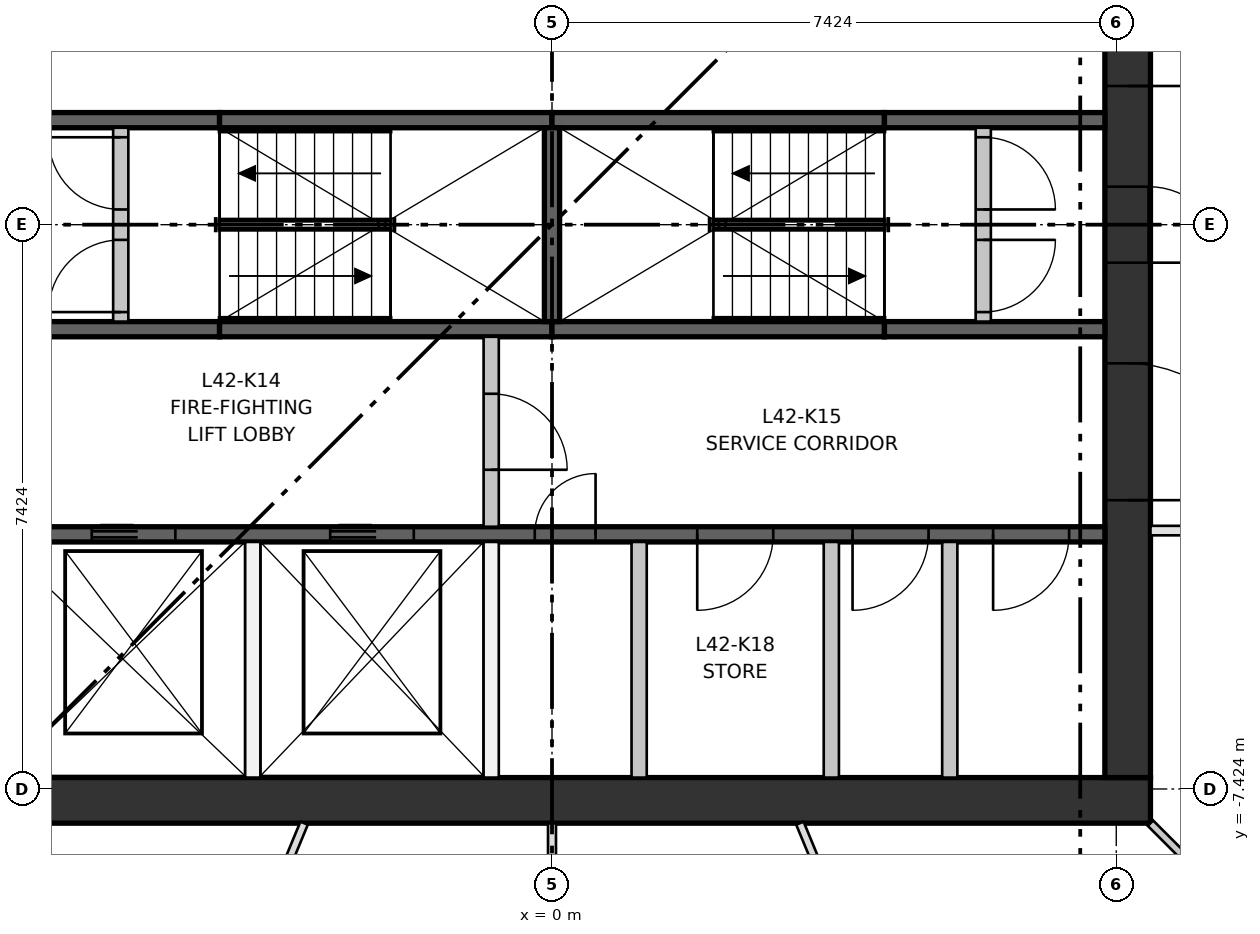
"""IFC4 building model, lengths in metres.
Left out: names, types, materials, properties, quantities, classifications, styles, units other than length and angle.
Written with IfcOpenShell. Run it as: python <this file> out.ifc"""

import sys

from ifc_helpers import new_model, si_unit, direction, frame, frame_2d, origin, place, context, subcontext, project, spatial, rectangle, extrude, element, fill, save


model = new_model("IFC4")
c1 = context("Model", 3, precision=1e-05, world=origin(), true_north=direction((0.0, 1.0)))
c2 = subcontext(c1, "Body", "Model", "MODEL_VIEW")
j1 = project(units=[si_unit("LENGTHUNIT", "METRE"), si_unit("PLANEANGLEUNIT", "RADIAN")], contexts=[c1])
p1 = place(None, origin())
s1 = spatial("IfcSite", under=j1, at=p1, CompositionType="ELEMENT")
p2 = place(p1, origin())
s2 = spatial("IfcBuilding", under=s1, at=p2, CompositionType="ELEMENT")
p3 = place(p2, frame((0.0, 0.0, 157.8)))
s3 = spatial("IfcBuildingStorey", under=s2, at=p3, CompositionType="ELEMENT", Elevation=157.8)
p4 = place(p3, frame((-7.874, -7.574, 0.0), z_axis=(0.0, 0.0, 1.0), x_axis=(1.0, 0.0, 0.0)))
e1 = element("IfcWall", 1, at=p4, inside=s3, PredefinedType="SHEAR", context=c2, shape_type="SweptSolid", body=[
    extrude(rectangle(XDim=15.748, YDim=0.6, at=frame_2d((7.874, 0.0))), origin(), (0.0, 0.0, 1.0), 3.35),
])
p5 = place(p3, frame((7.574, -7.274, 0.0), z_axis=(0.0, 0.0, 1.0), x_axis=(0.0, 1.0, 0.0)))
e2 = element("IfcWall", 2, at=p5, inside=s3, PredefinedType="SHEAR", context=c2, shape_type="SweptSolid", body=[
    extrude(rectangle(XDim=14.548, YDim=0.6, at=frame_2d((7.274, 0.0))), origin(), (0.0, 0.0, 1.0), 3.35),
])
p6 = place(p5, frame((6.774, 0.0, 0.0)))
e3 = element("IfcOpeningElement", 3, at=p6, cuts=e2, PredefinedType="OPENING", context=c2, shape_type="SweptSolid", body=[
    extrude(rectangle(XDim=1.0, YDim=2.1, at=frame_2d((0.5, 1.05))), frame((0.0, 0.31, 0.0), z_axis=(0.0, -1.0, 0.0), x_axis=(1.0, 0.0, 0.0)), (0.0, 0.0, 1.0), 0.62),
])
p7 = place(p5, frame((3.649, 0.0, 0.0)))
e4 = element("IfcOpeningElement", 4, at=p7, cuts=e2, PredefinedType="OPENING", context=c2, shape_type="SweptSolid", body=[
    extrude(rectangle(XDim=1.8, YDim=2.1, at=frame_2d((0.9, 1.05))), frame((0.0, 0.31, 0.0), z_axis=(0.0, -1.0, 0.0), x_axis=(1.0, 0.0, 0.0)), (0.0, 0.0, 1.0), 0.62),
])
p8 = place(p5, frame((9.098, 0.0, 0.0)))
e5 = element("IfcOpeningElement", 5, at=p8, cuts=e2, PredefinedType="OPENING", context=c2, shape_type="SweptSolid", body=[
    extrude(rectangle(XDim=1.8, YDim=2.1, at=frame_2d((0.9, 1.05))), frame((0.0, 0.31, 0.0), z_axis=(0.0, -1.0, 0.0), x_axis=(1.0, 0.0, 0.0)), (0.0, 0.0, 1.0), 0.62),
])
p9 = place(p3, frame((-7.274, -4.074, 0.0), z_axis=(0.0, 0.0, 1.0), x_axis=(1.0, 0.0, 0.0)))
e6 = element("IfcWall", 6, at=p9, inside=s3, PredefinedType="SHEAR", context=c2, shape_type="SweptSolid", body=[
    extrude(rectangle(XDim=14.548, YDim=0.2, at=frame_2d((7.274, 0.0))), origin(), (0.0, 0.0, 1.0), 3.0),
])
p10 = place(p9, frame((1.219, 0.0, 0.0)))
e7 = element("IfcOpeningElement", 7, at=p10, cuts=e6, PredefinedType="OPENING", context=c2, shape_type="SweptSolid", body=[
    extrude(rectangle(XDim=1.1, YDim=2.1, at=frame_2d((0.55, 1.05))), frame((0.0, 0.11, 0.0), z_axis=(0.0, -1.0, 0.0), x_axis=(1.0, 0.0, 0.0)), (0.0, 0.0, 1.0), 0.22),
])
p11 = place(p9, frame((4.355, 0.0, 0.0)))
e8 = element("IfcOpeningElement", 8, at=p11, cuts=e6, PredefinedType="OPENING", context=c2, shape_type="SweptSolid", body=[
    extrude(rectangle(XDim=1.1, YDim=2.1, at=frame_2d((0.55, 1.05))), frame((0.0, 0.11, 0.0), z_axis=(0.0, -1.0, 0.0), x_axis=(1.0, 0.0, 0.0)), (0.0, 0.0, 1.0), 0.22),
])
p12 = place(p9, frame((7.047, 0.0, 0.0)))
e9 = element("IfcOpeningElement", 9, at=p12, cuts=e6, PredefinedType="OPENING", context=c2, shape_type="SweptSolid", body=[
    extrude(rectangle(XDim=0.8, YDim=2.1, at=frame_2d((0.4, 1.05))), frame((0.0, 0.11, 0.0), z_axis=(0.0, -1.0, 0.0), x_axis=(1.0, 0.0, 0.0)), (0.0, 0.0, 1.0), 0.22),
])
p13 = place(p9, frame((9.185, 0.0, 0.0)))
e10 = element("IfcOpeningElement", 10, at=p13, cuts=e6, PredefinedType="OPENING", context=c2, shape_type="SweptSolid", body=[
    extrude(rectangle(XDim=1.0, YDim=2.1, at=frame_2d((0.5, 1.05))), frame((0.0, 0.11, 0.0), z_axis=(0.0, -1.0, 0.0), x_axis=(1.0, 0.0, 0.0)), (0.0, 0.0, 1.0), 0.22),
])
p14 = place(p9, frame((11.228, 0.0, 0.0)))
e11 = element("IfcOpeningElement", 11, at=p14, cuts=e6, PredefinedType="OPENING", context=c2, shape_type="SweptSolid", body=[
    extrude(rectangle(XDim=1.0, YDim=2.1, at=frame_2d((0.5, 1.05))), frame((0.0, 0.11, 0.0), z_axis=(0.0, -1.0, 0.0), x_axis=(1.0, 0.0, 0.0)), (0.0, 0.0, 1.0), 0.22),
])
p15 = place(p9, frame((13.078, 0.0, 0.0)))
e12 = element("IfcOpeningElement", 12, at=p15, cuts=e6, PredefinedType="OPENING", context=c2, shape_type="SweptSolid", body=[
    extrude(rectangle(XDim=1.0, YDim=2.1, at=frame_2d((0.5, 1.05))), frame((0.0, 0.11, 0.0), z_axis=(0.0, -1.0, 0.0), x_axis=(1.0, 0.0, 0.0)), (0.0, 0.0, 1.0), 0.22),
])
p16 = place(p3, frame((-7.274, -1.375, 0.0), z_axis=(0.0, 0.0, 1.0), x_axis=(1.0, 0.0, 0.0)))
e13 = element("IfcWall", 13, at=p16, inside=s3, PredefinedType="SHEAR", context=c2, shape_type="SweptSolid", body=[
    extrude(rectangle(XDim=2.9, YDim=0.2, at=frame_2d((1.45, 0.0))), origin(), (0.0, 0.0, 1.0), 3.0),
])
for number, where, z_axis, x_axis in (
    (14, (-4.374, -1.375, 0.0), (0.0, 0.0, 1.0), (1.0, 0.0, 0.0)),
    (15, (0.0, -1.375, 0.0), (0.0, 0.0, 1.0), (1.0, 0.0, 0.0)),
):
    element("IfcWall", number, at=place(p3, frame(where, z_axis=z_axis, x_axis=x_axis)), inside=s3, PredefinedType="SHEAR", context=c2, shape_type="SweptSolid", body=[
        extrude(rectangle(XDim=4.374, YDim=0.2, at=frame_2d((2.187, 0.0))), origin(), (0.0, 0.0, 1.0), 3.0),
    ])
for number, where, z_axis, x_axis in (
    (16, (4.374, -1.375, 0.0), (0.0, 0.0, 1.0), (1.0, 0.0, 0.0)),
    (17, (-7.274, 1.375, 0.0), (0.0, 0.0, 1.0), (1.0, 0.0, 0.0)),
):
    element("IfcWall", number, at=place(p3, frame(where, z_axis=z_axis, x_axis=x_axis)), inside=s3, PredefinedType="SHEAR", context=c2, shape_type="SweptSolid", body=[
        extrude(rectangle(XDim=2.9, YDim=0.2, at=frame_2d((1.45, 0.0))), origin(), (0.0, 0.0, 1.0), 3.0),
    ])
for number, where, z_axis, x_axis in (
    (18, (-4.374, 1.375, 0.0), (0.0, 0.0, 1.0), (1.0, 0.0, 0.0)),
    (19, (0.0, 1.375, 0.0), (0.0, 0.0, 1.0), (1.0, 0.0, 0.0)),
):
    element("IfcWall", number, at=place(p3, frame(where, z_axis=z_axis, x_axis=x_axis)), inside=s3, PredefinedType="SHEAR", context=c2, shape_type="SweptSolid", body=[
        extrude(rectangle(XDim=4.374, YDim=0.2, at=frame_2d((2.187, 0.0))), origin(), (0.0, 0.0, 1.0), 3.0),
    ])
p17 = place(p3, frame((4.374, 1.375, 0.0), z_axis=(0.0, 0.0, 1.0), x_axis=(1.0, 0.0, 0.0)))
e20 = element("IfcWall", 20, at=p17, inside=s3, PredefinedType="SHEAR", context=c2, shape_type="SweptSolid", body=[
    extrude(rectangle(XDim=2.9, YDim=0.2, at=frame_2d((1.45, 0.0))), origin(), (0.0, 0.0, 1.0), 3.0),
])
p18 = place(p3, frame((0.0, -1.275, 0.0), z_axis=(0.0, 0.0, 1.0), x_axis=(0.0, 1.0, 0.0)))
e21 = element("IfcWall", 21, at=p18, inside=s3, PredefinedType="SHEAR", context=c2, shape_type="SweptSolid", body=[
    extrude(rectangle(XDim=2.55, YDim=0.2, at=frame_2d((1.275, 0.0))), origin(), (0.0, 0.0, 1.0), 3.0),
])
for number, where, z_axis, x_axis in (
    (22, (-3.937, -7.274, 0.0), (0.0, 0.0, 1.0), (0.0, 1.0, 0.0)),
    (23, (-0.8, -7.274, 0.0), (0.0, 0.0, 1.0), (0.0, 1.0, 0.0)),
):
    element("IfcWall", number, at=place(p3, frame(where, z_axis=z_axis, x_axis=x_axis)), inside=s3, PredefinedType="PARTITIONING", context=c2, shape_type="SweptSolid", body=[
        extrude(rectangle(XDim=3.1, YDim=0.2, at=frame_2d((1.55, 0.0))), origin(), (0.0, 0.0, 1.0), 3.0),
    ])
p19 = place(p3, frame((-0.8, -3.974, 0.0), z_axis=(0.0, 0.0, 1.0), x_axis=(0.0, 1.0, 0.0)))
e24 = element("IfcWall", 24, at=p19, inside=s3, PredefinedType="PARTITIONING", context=c2, shape_type="SweptSolid", body=[
    extrude(rectangle(XDim=2.499, YDim=0.2, at=frame_2d((1.25, 0.0))), origin(), (0.0, 0.0, 1.0), 3.0),
])
p20 = place(p19, frame((0.75, 0.0, 0.0)))
e25 = element("IfcOpeningElement", 25, at=p20, cuts=e24, PredefinedType="OPENING", context=c2, shape_type="SweptSolid", body=[
    extrude(rectangle(XDim=1.0, YDim=2.1, at=frame_2d((0.5, 1.05))), frame((0.0, 0.11, 0.0), z_axis=(0.0, -1.0, 0.0), x_axis=(1.0, 0.0, 0.0)), (0.0, 0.0, 1.0), 0.22),
])
for number, where, z_axis, x_axis in (
    (26, (1.146, -7.274, 0.0), (0.0, 0.0, 1.0), (0.0, 1.0, 0.0)),
    (27, (3.675, -7.274, 0.0), (0.0, 0.0, 1.0), (0.0, 1.0, 0.0)),
    (28, (5.233, -7.274, 0.0), (0.0, 0.0, 1.0), (0.0, 1.0, 0.0)),
):
    element("IfcWall", number, at=place(p3, frame(where, z_axis=z_axis, x_axis=x_axis)), inside=s3, PredefinedType="PARTITIONING", context=c2, shape_type="SweptSolid", body=[
        extrude(rectangle(XDim=3.1, YDim=0.2, at=frame_2d((1.55, 0.0))), origin(), (0.0, 0.0, 1.0), 3.0),
    ])
p21 = place(p3, frame((-5.674, -1.275, 0.0), z_axis=(0.0, 0.0, 1.0), x_axis=(0.0, 1.0, 0.0)))
e29 = element("IfcWall", 29, at=p21, inside=s3, PredefinedType="PARTITIONING", context=c2, shape_type="SweptSolid", body=[
    extrude(rectangle(XDim=2.55, YDim=0.2, at=frame_2d((1.275, 0.0))), origin(), (0.0, 0.0, 1.0), 3.0),
])
p22 = place(p21, frame((0.125, 0.0, 0.0)))
e30 = element("IfcOpeningElement", 30, at=p22, cuts=e29, PredefinedType="OPENING", context=c2, shape_type="SweptSolid", body=[
    extrude(rectangle(XDim=0.95, YDim=2.1, at=frame_2d((0.475, 1.05))), frame((0.0, 0.11, 0.0), z_axis=(0.0, -1.0, 0.0), x_axis=(1.0, 0.0, 0.0)), (0.0, 0.0, 1.0), 0.22),
])
p23 = place(p21, frame((1.475, 0.0, 0.0)))
e31 = element("IfcOpeningElement", 31, at=p23, cuts=e29, PredefinedType="OPENING", context=c2, shape_type="SweptSolid", body=[
    extrude(rectangle(XDim=0.95, YDim=2.1, at=frame_2d((0.475, 1.05))), frame((0.0, 0.11, 0.0), z_axis=(0.0, -1.0, 0.0), x_axis=(1.0, 0.0, 0.0)), (0.0, 0.0, 1.0), 0.22),
])
p24 = place(p3, frame((5.674, -1.275, 0.0), z_axis=(0.0, 0.0, 1.0), x_axis=(0.0, 1.0, 0.0)))
e32 = element("IfcWall", 32, at=p24, inside=s3, PredefinedType="PARTITIONING", context=c2, shape_type="SweptSolid", body=[
    extrude(rectangle(XDim=2.55, YDim=0.2, at=frame_2d((1.275, 0.0))), origin(), (0.0, 0.0, 1.0), 3.0),
])
p25 = place(p24, frame((0.125, 0.0, 0.0)))
e33 = element("IfcOpeningElement", 33, at=p25, cuts=e32, PredefinedType="OPENING", context=c2, shape_type="SweptSolid", body=[
    extrude(rectangle(XDim=0.95, YDim=2.1, at=frame_2d((0.475, 1.05))), frame((0.0, 0.11, 0.0), z_axis=(0.0, -1.0, 0.0), x_axis=(1.0, 0.0, 0.0)), (0.0, 0.0, 1.0), 0.22),
])
p26 = place(p24, frame((1.475, 0.0, 0.0)))
e34 = element("IfcOpeningElement", 34, at=p26, cuts=e32, PredefinedType="OPENING", context=c2, shape_type="SweptSolid", body=[
    extrude(rectangle(XDim=0.95, YDim=2.1, at=frame_2d((0.475, 1.05))), frame((0.0, 0.11, 0.0), z_axis=(0.0, -1.0, 0.0), x_axis=(1.0, 0.0, 0.0)), (0.0, 0.0, 1.0), 0.22),
])
p27 = place(p3, frame((12.91, -4.024, 0.0), z_axis=(0.0, 0.0, 1.0), x_axis=(-1.0, 0.0, 0.0)))
e35 = element("IfcWall", 35, at=p27, inside=s3, PredefinedType="PARTITIONING", context=c2, shape_type="SweptSolid", body=[
    extrude(rectangle(XDim=5.036, YDim=0.125, at=frame_2d((2.518, 0.0))), origin(), (0.0, 0.0, 1.0), 3.0),
])
p28 = place(p27, frame((2.0, 0.0, 0.0)))
e36 = element("IfcOpeningElement", 36, at=p28, cuts=e35, PredefinedType="OPENING", context=c2, shape_type="SweptSolid", body=[
    extrude(rectangle(XDim=1.0, YDim=2.1, at=frame_2d((0.5, 1.05))), frame((0.0, 0.073, 0.0), z_axis=(0.0, -1.0, 0.0), x_axis=(1.0, 0.0, 0.0)), (0.0, 0.0, 1.0), 0.145),
])
p29 = place(p3, frame((-3.261, -7.874, 0.0), z_axis=(0.0, 0.0, 1.0), x_axis=(-0.38269858238, -0.923873257024, 0.0)))
e37 = element("IfcWall", 37, at=p29, inside=s3, PredefinedType="PARTITIONING", context=c2, shape_type="SweptSolid", body=[
    extrude(rectangle(XDim=4.207, YDim=0.105, at=frame_2d((2.104, 0.0))), origin(), (0.0, 0.0, 1.0), 3.0),
])
p30 = place(p3, frame((0.0, -7.874, 0.0), z_axis=(0.0, 0.0, 1.0), x_axis=(0.0, -1.0, 0.0)))
e38 = element("IfcWall", 38, at=p30, inside=s3, PredefinedType="PARTITIONING", context=c2, shape_type="SweptSolid", body=[
    extrude(rectangle(XDim=4.856, YDim=0.105, at=frame_2d((2.428, 0.0))), origin(), (0.0, 0.0, 1.0), 3.0),
])
p31 = place(p3, frame((4.872, -11.761, 0.0), z_axis=(0.0, 0.0, 1.0), x_axis=(-0.38269858238, 0.923873257024, 0.0)))
e39 = element("IfcWall", 39, at=p31, inside=s3, PredefinedType="PARTITIONING", context=c2, shape_type="SweptSolid", body=[
    extrude(rectangle(XDim=4.207, YDim=0.105, at=frame_2d((2.104, 0.0))), origin(), (0.0, 0.0, 1.0), 3.0),
])
p32 = place(p31, frame((1.6, 0.0, 0.0)))
e40 = element("IfcOpeningElement", 40, at=p32, cuts=e39, PredefinedType="OPENING", context=c2, shape_type="SweptSolid", body=[
    extrude(rectangle(XDim=1.0, YDim=2.1, at=frame_2d((0.5, 1.05))), frame((0.0, 0.062, 0.0), z_axis=(0.0, -1.0, 0.0), x_axis=(1.0, 0.0, 0.0)), (0.0, 0.0, 1.0), 0.125),
])
p33 = place(p3, frame((12.516, -12.516, 0.0), z_axis=(0.0, 0.0, 1.0), x_axis=(-0.707106781187, 0.707106781187, 0.0)))
e41 = element("IfcWall", 41, at=p33, inside=s3, PredefinedType="PARTITIONING", context=c2, shape_type="SweptSolid", body=[
    extrude(rectangle(XDim=6.564, YDim=0.1, at=frame_2d((3.282, 0.0))), origin(), (0.0, 0.0, 1.0), 3.0),
])
p34 = place(p33, frame((3.0, 0.0, 0.0)))
e42 = element("IfcOpeningElement", 42, at=p34, cuts=e41, PredefinedType="OPENING", context=c2, shape_type="SweptSolid", body=[
    extrude(rectangle(XDim=1.0, YDim=2.1, at=frame_2d((0.5, 1.05))), frame((0.0, 0.06, 0.0), z_axis=(0.0, -1.0, 0.0), x_axis=(1.0, 0.0, 0.0)), (0.0, 0.0, 1.0), 0.12),
])
p35 = place(p10, origin())
e43 = element("IfcDoor", 43, at=p35, inside=s3, OperationType="DOUBLE_DOOR_SLIDING", PredefinedType="DOOR", context=c2, shape_type="SweptSolid", body=[
    extrude(rectangle(XDim=1.1, YDim=2.1, at=frame_2d((0.55, 1.05))), frame((0.0, 0.025, 0.0), z_axis=(0.0, -1.0, 0.0), x_axis=(1.0, 0.0, 0.0)), (0.0, 0.0, 1.0), 0.05),
])
fill(e7, e43)
p36 = place(p11, origin())
e44 = element("IfcDoor", 44, at=p36, inside=s3, OperationType="DOUBLE_DOOR_SLIDING", PredefinedType="DOOR", context=c2, shape_type="SweptSolid", body=[
    extrude(rectangle(XDim=1.1, YDim=2.1, at=frame_2d((0.55, 1.05))), frame((0.0, 0.025, 0.0), z_axis=(0.0, -1.0, 0.0), x_axis=(1.0, 0.0, 0.0)), (0.0, 0.0, 1.0), 0.05),
])
fill(e8, e44)
p37 = place(p22, origin())
e45 = element("IfcDoor", 45, at=p37, inside=s3, OperationType="SINGLE_SWING_LEFT", PredefinedType="DOOR", context=c2, shape_type="SweptSolid", body=[
    extrude(rectangle(XDim=0.95, YDim=2.1, at=frame_2d((0.475, 1.05))), frame((0.0, 0.025, 0.0), z_axis=(0.0, -1.0, 0.0), x_axis=(1.0, 0.0, 0.0)), (0.0, 0.0, 1.0), 0.05),
])
fill(e30, e45)
p38 = place(p23, origin())
e46 = element("IfcDoor", 46, at=p38, inside=s3, OperationType="SINGLE_SWING_RIGHT", PredefinedType="DOOR", context=c2, shape_type="SweptSolid", body=[
    extrude(rectangle(XDim=0.95, YDim=2.1, at=frame_2d((0.475, 1.05))), frame((0.0, 0.025, 0.0), z_axis=(0.0, -1.0, 0.0), x_axis=(1.0, 0.0, 0.0)), (0.0, 0.0, 1.0), 0.05),
])
fill(e31, e46)
p39 = place(p25, frame((0.95, 0.0, 0.0), z_axis=(0.0, 0.0, 1.0), x_axis=(-1.0, 0.0, 0.0)))
e47 = element("IfcDoor", 47, at=p39, inside=s3, OperationType="SINGLE_SWING_RIGHT", PredefinedType="DOOR", context=c2, shape_type="SweptSolid", body=[
    extrude(rectangle(XDim=0.95, YDim=2.1, at=frame_2d((0.475, 1.05))), frame((0.0, 0.025, 0.0), z_axis=(0.0, -1.0, 0.0), x_axis=(1.0, 0.0, 0.0)), (0.0, 0.0, 1.0), 0.05),
])
fill(e33, e47)
p40 = place(p26, frame((0.95, 0.0, 0.0), z_axis=(0.0, 0.0, 1.0), x_axis=(-1.0, 0.0, 0.0)))
e48 = element("IfcDoor", 48, at=p40, inside=s3, OperationType="SINGLE_SWING_LEFT", PredefinedType="DOOR", context=c2, shape_type="SweptSolid", body=[
    extrude(rectangle(XDim=0.95, YDim=2.1, at=frame_2d((0.475, 1.05))), frame((0.0, 0.025, 0.0), z_axis=(0.0, -1.0, 0.0), x_axis=(1.0, 0.0, 0.0)), (0.0, 0.0, 1.0), 0.05),
])
fill(e34, e48)
p41 = place(p20, frame((1.0, 0.0, 0.0), z_axis=(0.0, 0.0, 1.0), x_axis=(-1.0, 0.0, 0.0)))
e49 = element("IfcDoor", 49, at=p41, inside=s3, OperationType="SINGLE_SWING_LEFT", PredefinedType="DOOR", context=c2, shape_type="SweptSolid", body=[
    extrude(rectangle(XDim=1.0, YDim=2.1, at=frame_2d((0.5, 1.05))), frame((0.0, 0.025, 0.0), z_axis=(0.0, -1.0, 0.0), x_axis=(1.0, 0.0, 0.0)), (0.0, 0.0, 1.0), 0.05),
])
fill(e25, e49)
p42 = place(p12, origin())
e50 = element("IfcDoor", 50, at=p42, inside=s3, OperationType="SINGLE_SWING_RIGHT", PredefinedType="DOOR", context=c2, shape_type="SweptSolid", body=[
    extrude(rectangle(XDim=0.8, YDim=2.1, at=frame_2d((0.4, 1.05))), frame((0.0, 0.025, 0.0), z_axis=(0.0, -1.0, 0.0), x_axis=(1.0, 0.0, 0.0)), (0.0, 0.0, 1.0), 0.05),
])
fill(e9, e50)
p43 = place(p13, frame((1.0, 0.0, 0.0), z_axis=(0.0, 0.0, 1.0), x_axis=(-1.0, 0.0, 0.0)))
e51 = element("IfcDoor", 51, at=p43, inside=s3, OperationType="SINGLE_SWING_LEFT", PredefinedType="DOOR", context=c2, shape_type="SweptSolid", body=[
    extrude(rectangle(XDim=1.0, YDim=2.1, at=frame_2d((0.5, 1.05))), frame((0.0, 0.025, 0.0), z_axis=(0.0, -1.0, 0.0), x_axis=(1.0, 0.0, 0.0)), (0.0, 0.0, 1.0), 0.05),
])
fill(e10, e51)
p44 = place(p14, frame((1.0, 0.0, 0.0), z_axis=(0.0, 0.0, 1.0), x_axis=(-1.0, 0.0, 0.0)))
e52 = element("IfcDoor", 52, at=p44, inside=s3, OperationType="SINGLE_SWING_LEFT", PredefinedType="DOOR", context=c2, shape_type="SweptSolid", body=[
    extrude(rectangle(XDim=1.0, YDim=2.1, at=frame_2d((0.5, 1.05))), frame((0.0, 0.025, 0.0), z_axis=(0.0, -1.0, 0.0), x_axis=(1.0, 0.0, 0.0)), (0.0, 0.0, 1.0), 0.05),
])
fill(e11, e52)
p45 = place(p15, frame((1.0, 0.0, 0.0), z_axis=(0.0, 0.0, 1.0), x_axis=(-1.0, 0.0, 0.0)))
e53 = element("IfcDoor", 53, at=p45, inside=s3, OperationType="SINGLE_SWING_LEFT", PredefinedType="DOOR", context=c2, shape_type="SweptSolid", body=[
    extrude(rectangle(XDim=1.0, YDim=2.1, at=frame_2d((0.5, 1.05))), frame((0.0, 0.025, 0.0), z_axis=(0.0, -1.0, 0.0), x_axis=(1.0, 0.0, 0.0)), (0.0, 0.0, 1.0), 0.05),
])
fill(e12, e53)
p46 = place(p6, frame((1.0, 0.0, 0.0), z_axis=(0.0, 0.0, 1.0), x_axis=(-1.0, 0.0, 0.0)))
e54 = element("IfcDoor", 54, at=p46, inside=s3, OperationType="SINGLE_SWING_LEFT", PredefinedType="DOOR", context=c2, shape_type="SweptSolid", body=[
    extrude(rectangle(XDim=1.0, YDim=2.1, at=frame_2d((0.5, 1.05))), frame((0.0, 0.3, 0.0), z_axis=(0.0, -1.0, 0.0), x_axis=(1.0, 0.0, 0.0)), (0.0, 0.0, 1.0), 0.05),
])
fill(e3, e54)
p47 = place(p7, frame((1.8, 0.0, 0.0), z_axis=(0.0, 0.0, 1.0), x_axis=(-1.0, 0.0, 0.0)))
e55 = element("IfcDoor", 55, at=p47, inside=s3, OperationType="DOUBLE_DOOR_SINGLE_SWING", PredefinedType="DOOR", context=c2, shape_type="SweptSolid", body=[
    extrude(rectangle(XDim=1.8, YDim=2.1, at=frame_2d((0.9, 1.05))), frame((0.0, 0.025, 0.0), z_axis=(0.0, -1.0, 0.0), x_axis=(1.0, 0.0, 0.0)), (0.0, 0.0, 1.0), 0.05),
])
fill(e4, e55)
p48 = place(p8, frame((1.8, 0.0, 0.0), z_axis=(0.0, 0.0, 1.0), x_axis=(-1.0, 0.0, 0.0)))
e56 = element("IfcDoor", 56, at=p48, inside=s3, OperationType="DOUBLE_DOOR_SINGLE_SWING", PredefinedType="DOOR", context=c2, shape_type="SweptSolid", body=[
    extrude(rectangle(XDim=1.8, YDim=2.1, at=frame_2d((0.9, 1.05))), frame((0.0, 0.025, 0.0), z_axis=(0.0, -1.0, 0.0), x_axis=(1.0, 0.0, 0.0)), (0.0, 0.0, 1.0), 0.05),
])
fill(e5, e56)
save(model, sys.argv[1])
